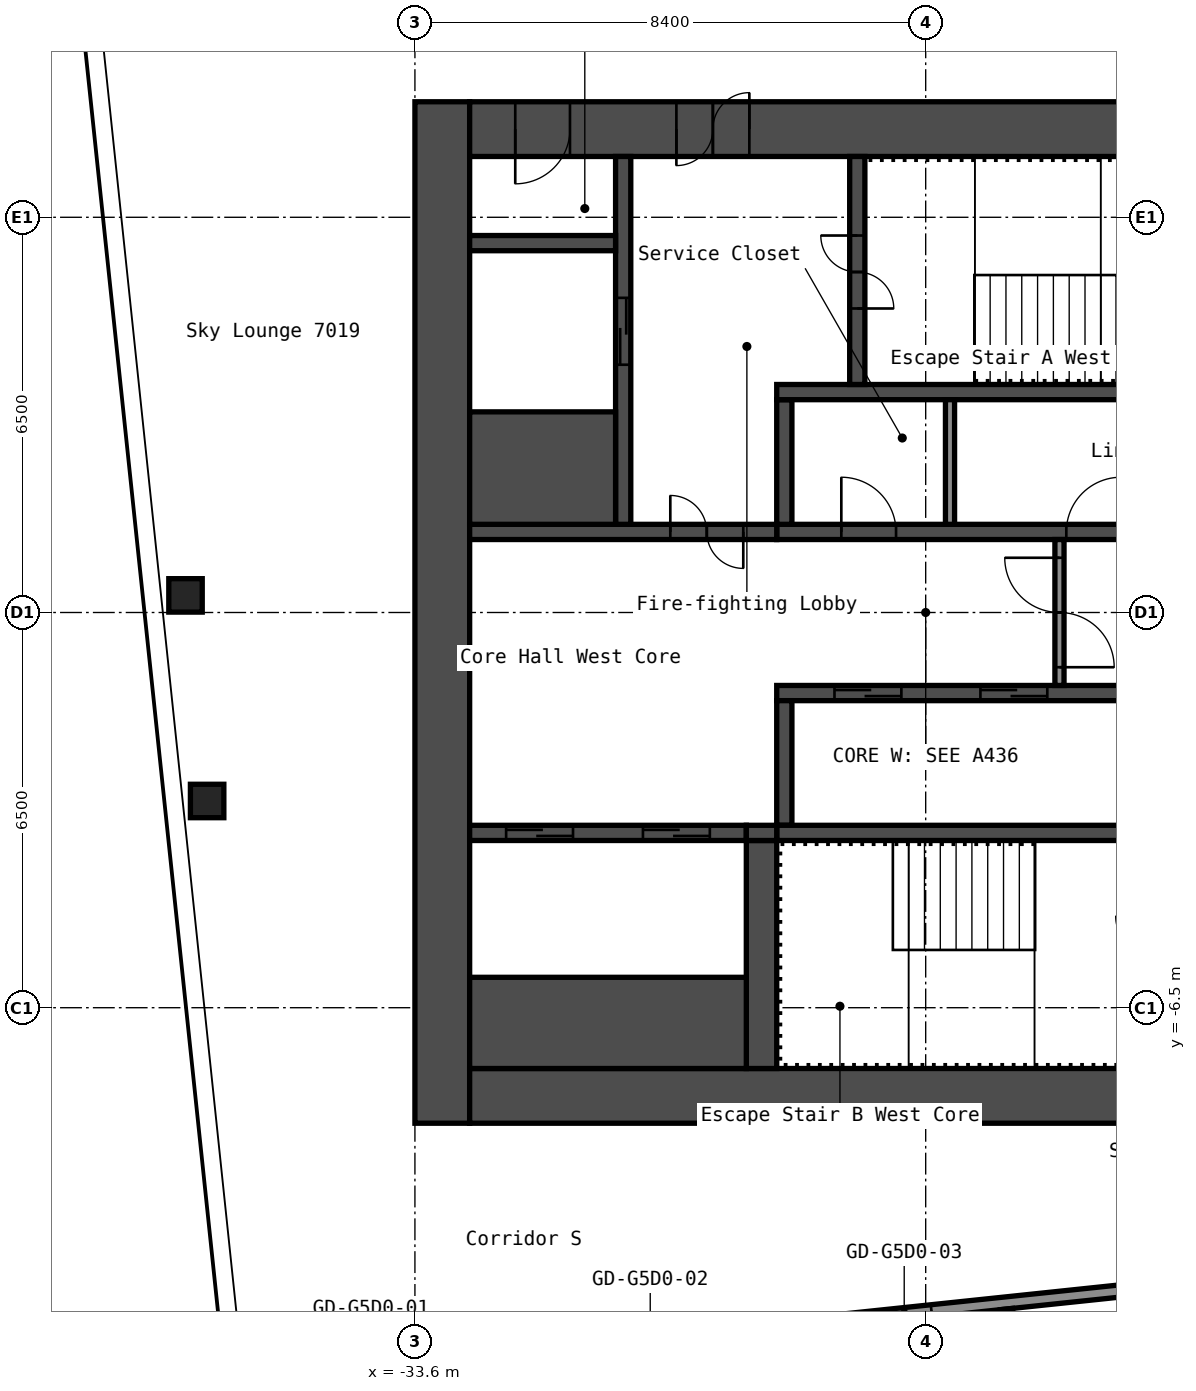
"""IFC4 building model, lengths in metres.
Left out: names, types, materials, properties, quantities, classifications, styles, units other than length and angle.
Written with IfcOpenShell. Run it as: python <this file> out.ifc"""

import sys

from ifc_helpers import new_model, si_unit, direction, frame, frame_2d, origin, origin_2d, place, context, subcontext, project, spatial, rectangle, hollow_rectangle, extrude, element, fill, save


model = new_model("IFC4")
c1 = context("Model", 3, precision=1e-05, world=origin(), true_north=direction((0.0, 1.0)))
c2 = subcontext(c1, "Body", "Model", "MODEL_VIEW")
j1 = project(units=[si_unit("LENGTHUNIT", "METRE"), si_unit("PLANEANGLEUNIT", "RADIAN")], contexts=[c1])
p1 = place(None, origin())
s1 = spatial("IfcSite", under=j1, at=p1, CompositionType="ELEMENT")
p2 = place(p1, origin())
s2 = spatial("IfcBuilding", under=s1, at=p2, CompositionType="ELEMENT")
p3 = place(p2, frame((0.0, 0.0, 248.6)))
s3 = spatial("IfcBuildingStorey", under=s2, at=p3, CompositionType="ELEMENT", Elevation=248.6)
for number, where, z_axis, x_axis in (
    (1, (-37.017, -3.1, 0.0), (0.0, 0.0, 1.0), (1.0, 0.0, 0.0)),
    (2, (-37.373, 0.281, 0.0), (0.0, 0.0, 1.0), (1.0, 0.0, 0.0)),
):
    element("IfcColumn", number, at=place(p3, frame(where, z_axis=z_axis, x_axis=x_axis)), inside=s3, PredefinedType="COLUMN", context=c2, shape_type="SweptSolid", body=[
        extrude(hollow_rectangle(XDim=0.55, YDim=0.55, WallThickness=0.022, InnerFilletRadius=0.033, OuterFilletRadius=0.055, at=origin_2d()), origin(), (0.0, 0.0, 1.0), 2.75),
    ])
p4 = place(p3, frame((-33.15, -8.4, 0.0), z_axis=(0.0, 0.0, 1.0), x_axis=(0.0, 1.0, 0.0)))
e3 = element("IfcWall", 3, at=p4, inside=s3, PredefinedType="SHEAR", context=c2, shape_type="SweptSolid", body=[
    extrude(rectangle(XDim=16.8, YDim=0.9, at=frame_2d((8.4, 0.0))), origin(), (0.0, 0.0, 1.0), 2.75),
])
p5 = place(p3, frame((-32.7, 7.95, 0.0), z_axis=(0.0, 0.0, 1.0), x_axis=(1.0, 0.0, 0.0)))
e4 = element("IfcWall", 4, at=p5, inside=s3, PredefinedType="SHEAR", context=c2, shape_type="SweptSolid", body=[
    extrude(rectangle(XDim=15.0, YDim=0.9, at=frame_2d((7.5, 0.0))), origin(), (0.0, 0.0, 1.0), 2.75),
])
p6 = place(p5, frame((3.4, 0.0, 0.0)))
e5 = element("IfcOpeningElement", 5, at=p6, cuts=e4, PredefinedType="OPENING", context=c2, shape_type="SweptSolid", body=[
    extrude(rectangle(XDim=1.2, YDim=2.1, at=frame_2d((0.6, 1.05))), frame((0.0, 0.46, 0.0), z_axis=(0.0, -1.0, 0.0), x_axis=(1.0, 0.0, 0.0)), (0.0, 0.0, 1.0), 0.92),
])
p7 = place(p5, frame((0.75, 0.0, 0.0)))
e6 = element("IfcOpeningElement", 6, at=p7, cuts=e4, PredefinedType="OPENING", context=c2, shape_type="SweptSolid", body=[
    extrude(rectangle(XDim=0.9, YDim=2.1, at=frame_2d((0.45, 1.05))), frame((0.0, 0.46, 0.0), z_axis=(0.0, -1.0, 0.0), x_axis=(1.0, 0.0, 0.0)), (0.0, 0.0, 1.0), 0.92),
])
p8 = place(p3, frame((-32.7, -7.95, 0.0), z_axis=(0.0, 0.0, 1.0), x_axis=(1.0, 0.0, 0.0)))
e7 = element("IfcWall", 7, at=p8, inside=s3, PredefinedType="SHEAR", context=c2, shape_type="SweptSolid", body=[
    extrude(rectangle(XDim=15.0, YDim=0.9, at=frame_2d((7.5, 0.0))), origin(), (0.0, 0.0, 1.0), 2.75),
])
p9 = place(p8, frame((11.45, 0.0, 0.0)))
e8 = element("IfcOpeningElement", 8, at=p9, cuts=e7, PredefinedType="OPENING", context=c2, shape_type="SweptSolid", body=[
    extrude(rectangle(XDim=1.0, YDim=2.1, at=frame_2d((0.5, 1.05))), frame((0.0, 0.46, 0.0), z_axis=(0.0, -1.0, 0.0), x_axis=(1.0, 0.0, 0.0)), (0.0, 0.0, 1.0), 0.92),
])
p10 = place(p3, frame((-27.65, 1.325, 0.0), z_axis=(0.0, 0.0, 1.0), x_axis=(1.0, 0.0, 0.0)))
e9 = element("IfcWall", 9, at=p10, inside=s3, PredefinedType="SHEAR", context=c2, shape_type="SweptSolid", body=[
    extrude(rectangle(XDim=7.5, YDim=0.25, at=frame_2d((3.75, 0.0))), origin(), (0.0, 0.0, 1.0), 2.75),
])
p11 = place(p10, frame((4.762, 0.0, 0.0)))
e10 = element("IfcOpeningElement", 10, at=p11, cuts=e9, PredefinedType="OPENING", context=c2, shape_type="SweptSolid", body=[
    extrude(rectangle(XDim=0.9, YDim=2.1, at=frame_2d((0.45, 1.05))), frame((0.0, 0.135, 0.0), z_axis=(0.0, -1.0, 0.0), x_axis=(1.0, 0.0, 0.0)), (0.0, 0.0, 1.0), 0.27),
])
p12 = place(p10, frame((1.062, 0.0, 0.0)))
e11 = element("IfcOpeningElement", 11, at=p12, cuts=e9, PredefinedType="OPENING", context=c2, shape_type="SweptSolid", body=[
    extrude(rectangle(XDim=0.9, YDim=2.1, at=frame_2d((0.45, 1.05))), frame((0.0, 0.135, 0.0), z_axis=(0.0, -1.0, 0.0), x_axis=(1.0, 0.0, 0.0)), (0.0, 0.0, 1.0), 0.27),
])
p13 = place(p3, frame((-27.525, 1.45, 0.0), z_axis=(0.0, 0.0, 1.0), x_axis=(0.0, 1.0, 0.0)))
e12 = element("IfcWall", 12, at=p13, inside=s3, PredefinedType="SHEAR", context=c2, shape_type="SweptSolid", body=[
    extrude(rectangle(XDim=2.05, YDim=0.25, at=frame_2d((1.025, 0.0))), origin(), (0.0, 0.0, 1.0), 2.75),
])
p14 = place(p3, frame((-27.65, 3.625, 0.0), z_axis=(0.0, 0.0, 1.0), x_axis=(1.0, 0.0, 0.0)))
e13 = element("IfcWall", 13, at=p14, inside=s3, PredefinedType="SHEAR", context=c2, shape_type="SweptSolid", body=[
    extrude(rectangle(XDim=7.5, YDim=0.25, at=frame_2d((3.75, 0.0))), origin(), (0.0, 0.0, 1.0), 2.75),
])
p15 = place(p3, frame((-26.325, 3.75, 0.0), z_axis=(0.0, 0.0, 1.0), x_axis=(0.0, 1.0, 0.0)))
e14 = element("IfcWall", 14, at=p15, inside=s3, PredefinedType="SHEAR", context=c2, shape_type="SweptSolid", body=[
    extrude(rectangle(XDim=3.75, YDim=0.25, at=frame_2d((1.875, 0.0))), origin(), (0.0, 0.0, 1.0), 2.75),
])
p16 = place(p15, frame((1.25, 0.0, 0.0)))
e15 = element("IfcOpeningElement", 15, at=p16, cuts=e14, PredefinedType="OPENING", context=c2, shape_type="SweptSolid", body=[
    extrude(rectangle(XDim=1.2, YDim=2.1, at=frame_2d((0.6, 1.05))), frame((0.0, 0.135, 0.0), z_axis=(0.0, -1.0, 0.0), x_axis=(1.0, 0.0, 0.0)), (0.0, 0.0, 1.0), 0.27),
])
p17 = place(p3, frame((-32.7, 1.325, 0.0), z_axis=(0.0, 0.0, 1.0), x_axis=(1.0, 0.0, 0.0)))
e16 = element("IfcWall", 16, at=p17, inside=s3, PredefinedType="SHEAR", context=c2, shape_type="SweptSolid", body=[
    extrude(rectangle(XDim=5.05, YDim=0.25, at=frame_2d((2.525, 0.0))), origin(), (0.0, 0.0, 1.0), 2.75),
])
p18 = place(p17, frame((3.3, 0.0, 0.0)))
e17 = element("IfcOpeningElement", 17, at=p18, cuts=e16, PredefinedType="OPENING", context=c2, shape_type="SweptSolid", body=[
    extrude(rectangle(XDim=1.2, YDim=2.1, at=frame_2d((0.6, 1.05))), frame((0.0, 0.135, 0.0), z_axis=(0.0, -1.0, 0.0), x_axis=(1.0, 0.0, 0.0)), (0.0, 0.0, 1.0), 0.27),
])
p19 = place(p3, frame((-30.175, 1.45, 0.0), z_axis=(0.0, 0.0, 1.0), x_axis=(0.0, 1.0, 0.0)))
e18 = element("IfcWall", 18, at=p19, inside=s3, PredefinedType="SHEAR", context=c2, shape_type="SweptSolid", body=[
    extrude(rectangle(XDim=6.05, YDim=0.25, at=frame_2d((3.025, 0.0))), origin(), (0.0, 0.0, 1.0), 2.75),
])
p20 = place(p19, frame((2.625, 0.0, 0.0)))
e19 = element("IfcOpeningElement", 19, at=p20, cuts=e18, PredefinedType="OPENING", context=c2, shape_type="SweptSolid", body=[
    extrude(rectangle(XDim=1.1, YDim=2.1, at=frame_2d((0.55, 1.05))), frame((0.0, 0.135, 0.0), z_axis=(0.0, -1.0, 0.0), x_axis=(1.0, 0.0, 0.0)), (0.0, 0.0, 1.0), 0.27),
])
p21 = place(p3, frame((-32.7, 2.375, 0.0), z_axis=(0.0, 0.0, 1.0), x_axis=(1.0, 0.0, 0.0)))
e20 = element("IfcWall", 20, at=p21, inside=s3, PredefinedType="SHEAR", context=c2, shape_type="SweptSolid", body=[
    extrude(rectangle(XDim=2.4, YDim=1.85, at=frame_2d((1.2, 0.0))), origin(), (0.0, 0.0, 1.0), 2.75),
])
p22 = place(p3, frame((-32.7, 6.075, 0.0), z_axis=(0.0, 0.0, 1.0), x_axis=(1.0, 0.0, 0.0)))
e21 = element("IfcWall", 21, at=p22, inside=s3, PredefinedType="SHEAR", context=c2, shape_type="SweptSolid", body=[
    extrude(rectangle(XDim=2.4, YDim=0.25, at=frame_2d((1.2, 0.0))), origin(), (0.0, 0.0, 1.0), 2.75),
])
p23 = place(p3, frame((-27.65, -1.325, 0.0), z_axis=(0.0, 0.0, 1.0), x_axis=(1.0, 0.0, 0.0)))
e22 = element("IfcWall", 22, at=p23, inside=s3, PredefinedType="SHEAR", context=c2, shape_type="SweptSolid", body=[
    extrude(rectangle(XDim=7.5, YDim=0.25, at=frame_2d((3.75, 0.0))), origin(), (0.0, 0.0, 1.0), 2.75),
])
p24 = place(p23, frame((5.75, 0.0, 0.0)))
e23 = element("IfcOpeningElement", 23, at=p24, cuts=e22, PredefinedType="OPENING", context=c2, shape_type="SweptSolid", body=[
    extrude(rectangle(XDim=1.1, YDim=2.1, at=frame_2d((0.55, 1.05))), frame((0.0, 0.135, 0.0), z_axis=(0.0, -1.0, 0.0), x_axis=(1.0, 0.0, 0.0)), (0.0, 0.0, 1.0), 0.27),
])
p25 = place(p23, frame((3.35, 0.0, 0.0)))
e24 = element("IfcOpeningElement", 24, at=p25, cuts=e22, PredefinedType="OPENING", context=c2, shape_type="SweptSolid", body=[
    extrude(rectangle(XDim=1.1, YDim=2.1, at=frame_2d((0.55, 1.05))), frame((0.0, 0.135, 0.0), z_axis=(0.0, -1.0, 0.0), x_axis=(1.0, 0.0, 0.0)), (0.0, 0.0, 1.0), 0.27),
])
p26 = place(p23, frame((0.95, 0.0, 0.0)))
e25 = element("IfcOpeningElement", 25, at=p26, cuts=e22, PredefinedType="OPENING", context=c2, shape_type="SweptSolid", body=[
    extrude(rectangle(XDim=1.1, YDim=2.1, at=frame_2d((0.55, 1.05))), frame((0.0, 0.135, 0.0), z_axis=(0.0, -1.0, 0.0), x_axis=(1.0, 0.0, 0.0)), (0.0, 0.0, 1.0), 0.27),
])
p27 = place(p3, frame((-27.525, -3.5, 0.0), z_axis=(0.0, 0.0, 1.0), x_axis=(0.0, 1.0, 0.0)))
e26 = element("IfcWall", 26, at=p27, inside=s3, PredefinedType="SHEAR", context=c2, shape_type="SweptSolid", body=[
    extrude(rectangle(XDim=2.05, YDim=0.25, at=frame_2d((1.025, 0.0))), origin(), (0.0, 0.0, 1.0), 2.75),
])
p28 = place(p3, frame((-27.65, -3.625, 0.0), z_axis=(0.0, 0.0, 1.0), x_axis=(1.0, 0.0, 0.0)))
e27 = element("IfcWall", 27, at=p28, inside=s3, PredefinedType="SHEAR", context=c2, shape_type="SweptSolid", body=[
    extrude(rectangle(XDim=7.5, YDim=0.25, at=frame_2d((3.75, 0.0))), origin(), (0.0, 0.0, 1.0), 2.75),
])
p29 = place(p3, frame((-27.9, -7.5, 0.0), z_axis=(0.0, 0.0, 1.0), x_axis=(0.0, 1.0, 0.0)))
e28 = element("IfcWall", 28, at=p29, inside=s3, PredefinedType="SHEAR", context=c2, shape_type="SweptSolid", body=[
    extrude(rectangle(XDim=3.75, YDim=0.5, at=frame_2d((1.875, 0.0))), origin(), (0.0, 0.0, 1.0), 2.75),
])
p30 = place(p3, frame((-32.7, -3.625, 0.0), z_axis=(0.0, 0.0, 1.0), x_axis=(1.0, 0.0, 0.0)))
e29 = element("IfcWall", 29, at=p30, inside=s3, PredefinedType="SHEAR", context=c2, shape_type="SweptSolid", body=[
    extrude(rectangle(XDim=4.55, YDim=0.25, at=frame_2d((2.275, 0.0))), origin(), (0.0, 0.0, 1.0), 2.75),
])
p31 = place(p30, frame((2.85, 0.0, 0.0)))
e30 = element("IfcOpeningElement", 30, at=p31, cuts=e29, PredefinedType="OPENING", context=c2, shape_type="SweptSolid", body=[
    extrude(rectangle(XDim=1.1, YDim=2.1, at=frame_2d((0.55, 1.05))), frame((0.0, 0.135, 0.0), z_axis=(0.0, -1.0, 0.0), x_axis=(1.0, 0.0, 0.0)), (0.0, 0.0, 1.0), 0.27),
])
p32 = place(p30, frame((0.6, 0.0, 0.0)))
e31 = element("IfcOpeningElement", 31, at=p32, cuts=e29, PredefinedType="OPENING", context=c2, shape_type="SweptSolid", body=[
    extrude(rectangle(XDim=1.1, YDim=2.1, at=frame_2d((0.55, 1.05))), frame((0.0, 0.135, 0.0), z_axis=(0.0, -1.0, 0.0), x_axis=(1.0, 0.0, 0.0)), (0.0, 0.0, 1.0), 0.27),
])
p33 = place(p3, frame((-32.7, -6.75, 0.0), z_axis=(0.0, 0.0, 1.0), x_axis=(1.0, 0.0, 0.0)))
e32 = element("IfcWall", 32, at=p33, inside=s3, PredefinedType="SHEAR", context=c2, shape_type="SweptSolid", body=[
    extrude(rectangle(XDim=4.55, YDim=1.5, at=frame_2d((2.275, 0.0))), origin(), (0.0, 0.0, 1.0), 2.75),
])
p34 = place(p3, frame((-28.15, -3.625, 0.0), z_axis=(0.0, 0.0, 1.0), x_axis=(1.0, 0.0, 0.0)))
e33 = element("IfcWall", 33, at=p34, inside=s3, PredefinedType="SHEAR", context=c2, shape_type="SweptSolid", body=[
    extrude(rectangle(XDim=0.5, YDim=0.25, at=frame_2d((0.25, 0.0))), origin(), (0.0, 0.0, 1.0), 2.75),
])
p35 = place(p3, frame((-23.0, -1.2, 0.0), z_axis=(0.0, 0.0, 1.0), x_axis=(0.0, 1.0, 0.0)))
e34 = element("IfcWall", 34, at=p35, inside=s3, PredefinedType="PARTITIONING", context=c2, shape_type="SweptSolid", body=[
    extrude(rectangle(XDim=2.4, YDim=0.15, at=frame_2d((1.2, 0.0))), origin(), (0.0, 0.0, 1.0), 2.75),
])
p36 = place(p35, frame((0.3, 0.0, 0.0)))
e35 = element("IfcOpeningElement", 35, at=p36, cuts=e34, PredefinedType="OPENING", context=c2, shape_type="SweptSolid", body=[
    extrude(rectangle(XDim=1.8, YDim=2.1, at=frame_2d((0.9, 1.05))), frame((0.0, 0.085, 0.0), z_axis=(0.0, -1.0, 0.0), x_axis=(1.0, 0.0, 0.0)), (0.0, 0.0, 1.0), 0.17),
])
p37 = place(p3, frame((-24.8, 1.45, 0.0), z_axis=(0.0, 0.0, 1.0), x_axis=(0.0, 1.0, 0.0)))
e36 = element("IfcWall", 36, at=p37, inside=s3, PredefinedType="PARTITIONING", context=c2, shape_type="SweptSolid", body=[
    extrude(rectangle(XDim=2.05, YDim=0.15, at=frame_2d((1.025, 0.0))), origin(), (0.0, 0.0, 1.0), 2.75),
])
p38 = place(p3, frame((-36.712, -12.705, 0.0), z_axis=(0.0, 0.0, 1.0), x_axis=(0.994522460242, 0.104523088709, 0.0)))
e37 = element("IfcWall", 37, at=p38, inside=s3, PredefinedType="PARTITIONING", context=c2, shape_type="SweptSolid", body=[
    extrude(rectangle(XDim=21.3, YDim=0.2, at=frame_2d((10.65, 0.0))), origin(), (0.0, 0.0, 1.0), 2.75),
])
p39 = place(p38, frame((1.95, 0.0, 0.0)))
e38 = element("IfcOpeningElement", 38, at=p39, cuts=e37, PredefinedType="OPENING", context=c2, shape_type="SweptSolid", body=[
    extrude(rectangle(XDim=0.9, YDim=2.1, at=frame_2d((0.45, 1.05))), frame((0.0, 0.11, 0.0), z_axis=(0.0, -1.0, 0.0), x_axis=(1.0, 0.0, 0.0)), (0.0, 0.0, 1.0), 0.22),
])
p40 = place(p38, frame((6.57, 0.0, 0.0)))
e39 = element("IfcOpeningElement", 39, at=p40, cuts=e37, PredefinedType="OPENING", context=c2, shape_type="SweptSolid", body=[
    extrude(rectangle(XDim=0.9, YDim=2.1, at=frame_2d((0.45, 1.05))), frame((0.0, 0.11, 0.0), z_axis=(0.0, -1.0, 0.0), x_axis=(1.0, 0.0, 0.0)), (0.0, 0.0, 1.0), 0.22),
])
p41 = place(p38, frame((10.77, 0.0, 0.0)))
e40 = element("IfcOpeningElement", 40, at=p41, cuts=e37, PredefinedType="OPENING", context=c2, shape_type="SweptSolid", body=[
    extrude(rectangle(XDim=0.9, YDim=2.1, at=frame_2d((0.45, 1.05))), frame((0.0, 0.11, 0.0), z_axis=(0.0, -1.0, 0.0), x_axis=(1.0, 0.0, 0.0)), (0.0, 0.0, 1.0), 0.22),
])
p42 = place(p38, frame((16.6, 0.0, 0.0)))
e41 = element("IfcOpeningElement", 41, at=p42, cuts=e37, PredefinedType="OPENING", context=c2, shape_type="SweptSolid", body=[
    extrude(rectangle(XDim=1.0, YDim=2.1, at=frame_2d((0.5, 1.05))), frame((0.0, 0.11, 0.0), z_axis=(0.0, -1.0, 0.0), x_axis=(1.0, 0.0, 0.0)), (0.0, 0.0, 1.0), 0.22),
])
p43 = place(p3, frame((-23.254, -17.339, 0.0), z_axis=(0.0, 0.0, 1.0), x_axis=(-0.10453655107, 0.994521045273, 0.0)))
e42 = element("IfcWall", 42, at=p43, inside=s3, PredefinedType="PARTITIONING", context=c2, shape_type="SweptSolid", body=[
    extrude(rectangle(XDim=5.916, YDim=0.2, at=frame_2d((2.958, 0.0))), origin(), (0.0, 0.0, 1.0), 2.75),
])
p44 = place(p6, origin())
e43 = element("IfcDoor", 43, at=p44, inside=s3, OperationType="DOUBLE_DOOR_SINGLE_SWING", PredefinedType="DOOR", context=c2, shape_type="SweptSolid", body=[
    extrude(rectangle(XDim=1.2, YDim=2.1, at=frame_2d((0.6, 1.05))), frame((0.0, 0.025, 0.0), z_axis=(0.0, -1.0, 0.0), x_axis=(1.0, 0.0, 0.0)), (0.0, 0.0, 1.0), 0.05),
])
fill(e5, e43)
p45 = place(p7, origin())
e44 = element("IfcDoor", 44, at=p45, inside=s3, OperationType="SINGLE_SWING_LEFT", PredefinedType="DOOR", context=c2, shape_type="SweptSolid", body=[
    extrude(rectangle(XDim=0.9, YDim=2.1, at=frame_2d((0.45, 1.05))), frame((0.0, 0.025, 0.0), z_axis=(0.0, -1.0, 0.0), x_axis=(1.0, 0.0, 0.0)), (0.0, 0.0, 1.0), 0.05),
])
fill(e6, e44)
p46 = place(p16, origin())
e45 = element("IfcDoor", 45, at=p46, inside=s3, OperationType="DOUBLE_DOOR_SINGLE_SWING", PredefinedType="DOOR", context=c2, shape_type="SweptSolid", body=[
    extrude(rectangle(XDim=1.2, YDim=2.1, at=frame_2d((0.6, 1.05))), frame((0.0, 0.025, 0.0), z_axis=(0.0, -1.0, 0.0), x_axis=(1.0, 0.0, 0.0)), (0.0, 0.0, 1.0), 0.05),
])
fill(e15, e45)
p47 = place(p18, origin())
e46 = element("IfcDoor", 46, at=p47, inside=s3, OperationType="DOUBLE_DOOR_SINGLE_SWING", PredefinedType="DOOR", context=c2, shape_type="SweptSolid", body=[
    extrude(rectangle(XDim=1.2, YDim=2.1, at=frame_2d((0.6, 1.05))), frame((0.0, 0.025, 0.0), z_axis=(0.0, -1.0, 0.0), x_axis=(1.0, 0.0, 0.0)), (0.0, 0.0, 1.0), 0.05),
])
fill(e17, e46)
p48 = place(p36, origin())
e47 = element("IfcDoor", 47, at=p48, inside=s3, OperationType="DOUBLE_DOOR_SINGLE_SWING", PredefinedType="DOOR", context=c2, shape_type="SweptSolid", body=[
    extrude(rectangle(XDim=1.8, YDim=2.1, at=frame_2d((0.9, 1.05))), frame((0.0, 0.025, 0.0), z_axis=(0.0, -1.0, 0.0), x_axis=(1.0, 0.0, 0.0)), (0.0, 0.0, 1.0), 0.05),
])
fill(e35, e47)
p49 = place(p11, origin())
e48 = element("IfcDoor", 48, at=p49, inside=s3, OperationType="SINGLE_SWING_LEFT", PredefinedType="DOOR", context=c2, shape_type="SweptSolid", body=[
    extrude(rectangle(XDim=0.9, YDim=2.1, at=frame_2d((0.45, 1.05))), frame((0.0, 0.025, 0.0), z_axis=(0.0, -1.0, 0.0), x_axis=(1.0, 0.0, 0.0)), (0.0, 0.0, 1.0), 0.05),
])
fill(e10, e48)
p50 = place(p12, origin())
e49 = element("IfcDoor", 49, at=p50, inside=s3, OperationType="SINGLE_SWING_RIGHT", PredefinedType="DOOR", context=c2, shape_type="SweptSolid", body=[
    extrude(rectangle(XDim=0.9, YDim=2.1, at=frame_2d((0.45, 1.05))), frame((0.0, 0.025, 0.0), z_axis=(0.0, -1.0, 0.0), x_axis=(1.0, 0.0, 0.0)), (0.0, 0.0, 1.0), 0.05),
])
fill(e11, e49)
p51 = place(p25, origin())
e50 = element("IfcDoor", 50, at=p51, inside=s3, OperationType="DOUBLE_DOOR_SLIDING", PredefinedType="DOOR", context=c2, shape_type="SweptSolid", body=[
    extrude(rectangle(XDim=1.1, YDim=2.1, at=frame_2d((0.55, 1.05))), frame((0.0, 0.025, 0.0), z_axis=(0.0, -1.0, 0.0), x_axis=(1.0, 0.0, 0.0)), (0.0, 0.0, 1.0), 0.05),
])
fill(e24, e50)
p52 = place(p26, origin())
e51 = element("IfcDoor", 51, at=p52, inside=s3, OperationType="DOUBLE_DOOR_SLIDING", PredefinedType="DOOR", context=c2, shape_type="SweptSolid", body=[
    extrude(rectangle(XDim=1.1, YDim=2.1, at=frame_2d((0.55, 1.05))), frame((0.0, 0.025, 0.0), z_axis=(0.0, -1.0, 0.0), x_axis=(1.0, 0.0, 0.0)), (0.0, 0.0, 1.0), 0.05),
])
fill(e25, e51)
p53 = place(p20, origin())
e52 = element("IfcDoor", 52, at=p53, inside=s3, OperationType="DOUBLE_DOOR_SLIDING", PredefinedType="DOOR", context=c2, shape_type="SweptSolid", body=[
    extrude(rectangle(XDim=1.1, YDim=2.1, at=frame_2d((0.55, 1.05))), frame((0.0, 0.025, 0.0), z_axis=(0.0, -1.0, 0.0), x_axis=(1.0, 0.0, 0.0)), (0.0, 0.0, 1.0), 0.05),
])
fill(e19, e52)
p54 = place(p31, origin())
e53 = element("IfcDoor", 53, at=p54, inside=s3, OperationType="DOUBLE_DOOR_SLIDING", PredefinedType="DOOR", context=c2, shape_type="SweptSolid", body=[
    extrude(rectangle(XDim=1.1, YDim=2.1, at=frame_2d((0.55, 1.05))), frame((0.0, 0.025, 0.0), z_axis=(0.0, -1.0, 0.0), x_axis=(1.0, 0.0, 0.0)), (0.0, 0.0, 1.0), 0.05),
])
fill(e30, e53)
p55 = place(p32, origin())
e54 = element("IfcDoor", 54, at=p55, inside=s3, OperationType="DOUBLE_DOOR_SLIDING", PredefinedType="DOOR", context=c2, shape_type="SweptSolid", body=[
    extrude(rectangle(XDim=1.1, YDim=2.1, at=frame_2d((0.55, 1.05))), frame((0.0, 0.025, 0.0), z_axis=(0.0, -1.0, 0.0), x_axis=(1.0, 0.0, 0.0)), (0.0, 0.0, 1.0), 0.05),
])
fill(e31, e54)
p56 = place(p41, origin())
e55 = element("IfcDoor", 55, at=p56, inside=s3, OperationType="SINGLE_SWING_RIGHT", PredefinedType="DOOR", context=c2, shape_type="SweptSolid", body=[
    extrude(rectangle(XDim=0.9, YDim=2.1, at=frame_2d((0.45, 1.05))), frame((0.0, 0.025, 0.0), z_axis=(0.0, -1.0, 0.0), x_axis=(1.0, 0.0, 0.0)), (0.0, 0.0, 1.0), 0.05),
])
fill(e40, e55)
save(model, sys.argv[1])
